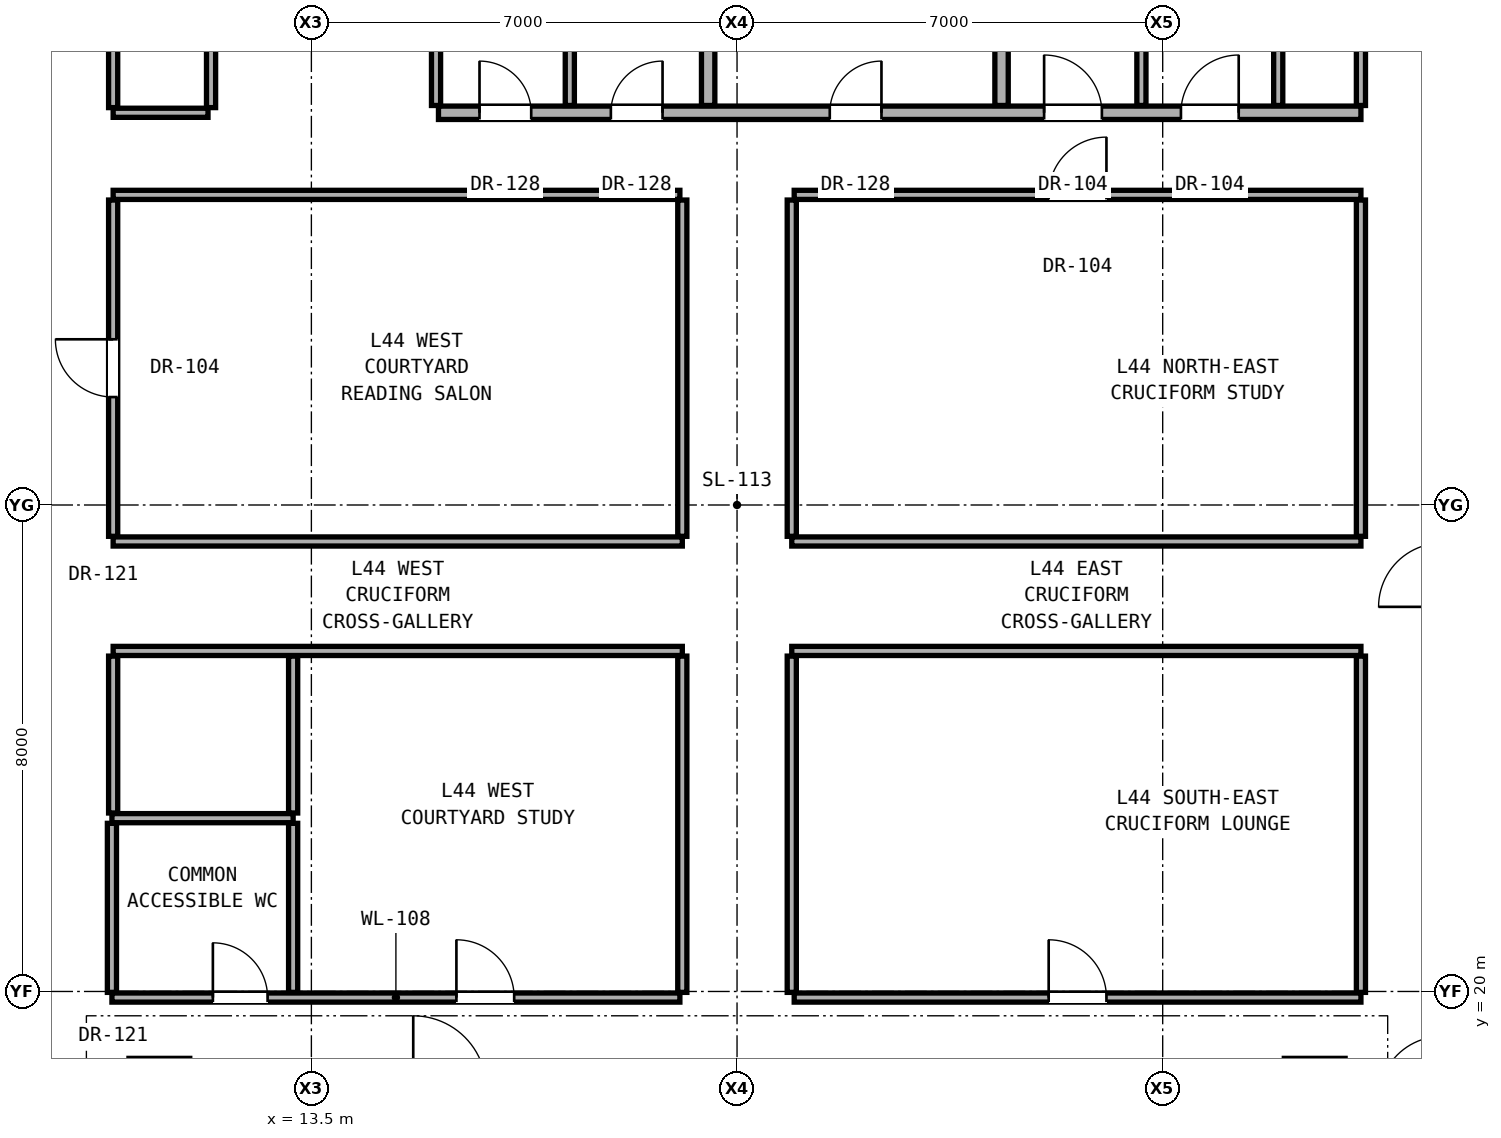
"""IFC4 building model, lengths in metres.
Left out: names, types, materials, properties, quantities, classifications, styles, units other than length and angle.
Written with IfcOpenShell. Run it as: python <this file> out.ifc"""

import sys

from ifc_helpers import new_model, si_unit, direction, frame, frame_2d, origin, place, context, subcontext, project, spatial, rectangle, extrude, element, fill, save


model = new_model("IFC4")
c1 = context("Model", 3, precision=1e-05, world=origin(), true_north=direction((0.0, 1.0)))
c2 = subcontext(c1, "Body", "Model", "MODEL_VIEW")
j1 = project(units=[si_unit("LENGTHUNIT", "METRE"), si_unit("PLANEANGLEUNIT", "RADIAN")], contexts=[c1])
p1 = place(None, origin())
s1 = spatial("IfcSite", under=j1, at=p1, CompositionType="ELEMENT")
p2 = place(p1, origin())
s2 = spatial("IfcBuilding", under=s1, at=p2, CompositionType="ELEMENT")
p3 = place(p2, frame((0.0, 0.0, 157.65)))
s3 = spatial("IfcBuildingStorey", under=s2, at=p3, CompositionType="ELEMENT", Elevation=157.65)
p4 = place(p3, frame((10.22, 19.9, 0.0), z_axis=(0.0, 0.0, 1.0), x_axis=(1.0, 0.0, 0.0)))
e1 = element("IfcWall", 1, at=p4, inside=s3, PredefinedType="PARTITIONING", context=c2, shape_type="SweptSolid", body=[
    extrude(rectangle(XDim=9.34, YDim=0.15, at=frame_2d((4.67, 0.0))), origin(), (0.0, 0.0, 1.0), 2.186),
])
p5 = place(p4, frame((1.66, 0.0, 0.0)))
e2 = element("IfcOpeningElement", 2, at=p5, cuts=e1, PredefinedType="OPENING", context=c2, shape_type="SweptSolid", body=[
    extrude(rectangle(XDim=0.9, YDim=2.1, at=frame_2d((0.45, 1.05))), frame((0.0, 0.085, 0.0), z_axis=(0.0, -1.0, 0.0), x_axis=(1.0, 0.0, 0.0)), (0.0, 0.0, 1.0), 0.17),
])
p6 = place(p4, frame((5.665, 0.0, 0.0)))
e3 = element("IfcOpeningElement", 3, at=p6, cuts=e1, PredefinedType="OPENING", context=c2, shape_type="SweptSolid", body=[
    extrude(rectangle(XDim=0.95, YDim=2.15, at=frame_2d((0.475, 1.075))), frame((0.0, 0.085, 0.0), z_axis=(0.0, -1.0, 0.0), x_axis=(1.0, 0.0, 0.0)), (0.0, 0.0, 1.0), 0.17),
])
p7 = place(p3, frame((21.44, 19.9, 0.0), z_axis=(0.0, 0.0, 1.0), x_axis=(1.0, 0.0, 0.0)))
e4 = element("IfcWall", 4, at=p7, inside=s3, PredefinedType="PARTITIONING", context=c2, shape_type="SweptSolid", body=[
    extrude(rectangle(XDim=9.32, YDim=0.15, at=frame_2d((4.66, 0.0))), origin(), (0.0, 0.0, 1.0), 2.186),
])
p8 = place(p7, frame((4.185, 0.0, 0.0)))
e5 = element("IfcOpeningElement", 5, at=p8, cuts=e4, PredefinedType="OPENING", context=c2, shape_type="SweptSolid", body=[
    extrude(rectangle(XDim=0.95, YDim=2.15, at=frame_2d((0.475, 1.075))), frame((0.0, 0.085, 0.0), z_axis=(0.0, -1.0, 0.0), x_axis=(1.0, 0.0, 0.0)), (0.0, 0.0, 1.0), 0.17),
])
p9 = place(p3, frame((10.22, 22.85, 0.0), z_axis=(0.0, 0.0, 1.0), x_axis=(1.0, 0.0, 0.0)))
e6 = element("IfcWall", 6, at=p9, inside=s3, PredefinedType="PARTITIONING", context=c2, shape_type="SweptSolid", body=[
    extrude(rectangle(XDim=2.98, YDim=0.15, at=frame_2d((1.49, 0.0))), origin(), (0.0, 0.0, 1.0), 2.186),
])
for number, where, z_axis, x_axis in (
    (7, (10.24, 25.6, 0.0), (0.0, 0.0, 1.0), (1.0, 0.0, 0.0)),
    (8, (21.4, 25.6, 0.0), (0.0, 0.0, 1.0), (1.0, 0.0, 0.0)),
    (9, (10.24, 27.4, 0.0), (0.0, 0.0, 1.0), (1.0, 0.0, 0.0)),
    (10, (21.4, 27.4, 0.0), (0.0, 0.0, 1.0), (1.0, 0.0, 0.0)),
):
    element("IfcWall", number, at=place(p3, frame(where, z_axis=z_axis, x_axis=x_axis)), inside=s3, PredefinedType="PARTITIONING", context=c2, shape_type="SweptSolid", body=[
        extrude(rectangle(XDim=9.36, YDim=0.15, at=frame_2d((4.68, 0.0))), origin(), (0.0, 0.0, 1.0), 2.186),
    ])
p10 = place(p3, frame((10.24, 33.1, 0.0), z_axis=(0.0, 0.0, 1.0), x_axis=(1.0, 0.0, 0.0)))
e11 = element("IfcWall", 11, at=p10, inside=s3, PredefinedType="PARTITIONING", context=c2, shape_type="SweptSolid", body=[
    extrude(rectangle(XDim=9.32, YDim=0.15, at=frame_2d((4.66, 0.0))), origin(), (0.0, 0.0, 1.0), 2.186),
])
p11 = place(p3, frame((21.44, 33.1, 0.0), z_axis=(0.0, 0.0, 1.0), x_axis=(1.0, 0.0, 0.0)))
e12 = element("IfcWall", 12, at=p11, inside=s3, PredefinedType="PARTITIONING", context=c2, shape_type="SweptSolid", body=[
    extrude(rectangle(XDim=9.32, YDim=0.15, at=frame_2d((4.66, 0.0))), origin(), (0.0, 0.0, 1.0), 2.186),
])
p12 = place(p11, frame((4.185, 0.0, 0.0)))
e13 = element("IfcOpeningElement", 13, at=p12, cuts=e12, PredefinedType="OPENING", context=c2, shape_type="SweptSolid", body=[
    extrude(rectangle(XDim=0.95, YDim=2.15, at=frame_2d((0.475, 1.075))), frame((0.0, 0.085, 0.0), z_axis=(0.0, -1.0, 0.0), x_axis=(1.0, 0.0, 0.0)), (0.0, 0.0, 1.0), 0.17),
])
p13 = place(p3, frame((10.24, 34.45, 0.0), z_axis=(0.0, 0.0, 1.0), x_axis=(1.0, 0.0, 0.0)))
e14 = element("IfcWall", 14, at=p13, inside=s3, PredefinedType="PARTITIONING", context=c2, shape_type="SweptSolid", body=[
    extrude(rectangle(XDim=1.56, YDim=0.15, at=frame_2d((0.78, 0.0))), origin(), (0.0, 0.0, 1.0), 2.186),
])
p14 = place(p3, frame((15.59, 34.45, 0.0), z_axis=(0.0, 0.0, 1.0), x_axis=(1.0, 0.0, 0.0)))
e15 = element("IfcWall", 15, at=p14, inside=s3, PredefinedType="SOLIDWALL", context=c2, shape_type="SweptSolid", body=[
    extrude(rectangle(XDim=15.17, YDim=0.22, at=frame_2d((7.585, 0.0))), origin(), (0.0, 0.0, 1.0), 2.186),
])
p15 = place(p14, frame((6.435, 0.0, 0.0)))
e16 = element("IfcOpeningElement", 16, at=p15, cuts=e15, PredefinedType="OPENING", context=c2, shape_type="SweptSolid", body=[
    extrude(rectangle(XDim=0.85, YDim=2.01, at=frame_2d((0.425, 1.005))), frame((0.0, 0.12, 0.0), z_axis=(0.0, -1.0, 0.0), x_axis=(1.0, 0.0, 0.0)), (0.0, 0.0, 1.0), 0.24),
])
p16 = place(p14, frame((9.96, 0.0, 0.0)))
e17 = element("IfcOpeningElement", 17, at=p16, cuts=e15, PredefinedType="OPENING", context=c2, shape_type="SweptSolid", body=[
    extrude(rectangle(XDim=0.95, YDim=2.15, at=frame_2d((0.475, 1.075))), frame((0.0, 0.12, 0.0), z_axis=(0.0, -1.0, 0.0), x_axis=(1.0, 0.0, 0.0)), (0.0, 0.0, 1.0), 0.24),
])
p17 = place(p14, frame((12.21, 0.0, 0.0)))
e18 = element("IfcOpeningElement", 18, at=p17, cuts=e15, PredefinedType="OPENING", context=c2, shape_type="SweptSolid", body=[
    extrude(rectangle(XDim=0.95, YDim=2.15, at=frame_2d((0.475, 1.075))), frame((0.0, 0.12, 0.0), z_axis=(0.0, -1.0, 0.0), x_axis=(1.0, 0.0, 0.0)), (0.0, 0.0, 1.0), 0.24),
])
p18 = place(p14, frame((0.675, 0.0, 0.0)))
e19 = element("IfcOpeningElement", 19, at=p18, cuts=e15, PredefinedType="OPENING", context=c2, shape_type="SweptSolid", body=[
    extrude(rectangle(XDim=0.85, YDim=2.01, at=frame_2d((0.425, 1.005))), frame((0.0, 0.12, 0.0), z_axis=(0.0, -1.0, 0.0), x_axis=(1.0, 0.0, 0.0)), (0.0, 0.0, 1.0), 0.24),
])
p19 = place(p14, frame((2.835, 0.0, 0.0)))
e20 = element("IfcOpeningElement", 20, at=p19, cuts=e15, PredefinedType="OPENING", context=c2, shape_type="SweptSolid", body=[
    extrude(rectangle(XDim=0.85, YDim=2.01, at=frame_2d((0.425, 1.005))), frame((0.0, 0.12, 0.0), z_axis=(0.0, -1.0, 0.0), x_axis=(1.0, 0.0, 0.0)), (0.0, 0.0, 1.0), 0.24),
])
p20 = place(p3, frame((10.22, 19.985, 0.0), z_axis=(0.0, 0.0, 1.0), x_axis=(0.0, 1.0, 0.0)))
e21 = element("IfcWall", 21, at=p20, inside=s3, PredefinedType="PARTITIONING", context=c2, shape_type="SweptSolid", body=[
    extrude(rectangle(XDim=2.78, YDim=0.15, at=frame_2d((1.39, 0.0))), origin(), (0.0, 0.0, 1.0), 3.05),
])
p21 = place(p3, frame((10.24, 22.935, 0.0), z_axis=(0.0, 0.0, 1.0), x_axis=(0.0, 1.0, 0.0)))
e22 = element("IfcWall", 22, at=p21, inside=s3, PredefinedType="PARTITIONING", context=c2, shape_type="SweptSolid", body=[
    extrude(rectangle(XDim=2.58, YDim=0.15, at=frame_2d((1.29, 0.0))), origin(), (0.0, 0.0, 1.0), 2.346),
])
p22 = place(p3, frame((10.24, 27.485, 0.0), z_axis=(0.0, 0.0, 1.0), x_axis=(0.0, 1.0, 0.0)))
e23 = element("IfcWall", 23, at=p22, inside=s3, PredefinedType="PARTITIONING", context=c2, shape_type="SweptSolid", body=[
    extrude(rectangle(XDim=5.53, YDim=0.15, at=frame_2d((2.765, 0.0))), origin(), (0.0, 0.0, 1.0), 2.346),
])
p23 = place(p22, frame((2.29, 0.0, 0.0)))
e24 = element("IfcOpeningElement", 24, at=p23, cuts=e23, PredefinedType="OPENING", context=c2, shape_type="SweptSolid", body=[
    extrude(rectangle(XDim=0.95, YDim=2.15, at=frame_2d((0.475, 1.075))), frame((0.0, 0.085, 0.0), z_axis=(0.0, -1.0, 0.0), x_axis=(1.0, 0.0, 0.0)), (0.0, 0.0, 1.0), 0.17),
])
p24 = place(p3, frame((10.24, 34.535, 0.0), z_axis=(0.0, 0.0, 1.0), x_axis=(0.0, 1.0, 0.0)))
e25 = element("IfcWall", 25, at=p24, inside=s3, PredefinedType="PARTITIONING", context=c2, shape_type="SweptSolid", body=[
    extrude(rectangle(XDim=9.13, YDim=0.15, at=frame_2d((4.565, 0.0))), origin(), (0.0, 0.0, 1.0), 2.442),
])
p25 = place(p3, frame((11.85, 34.535, 0.0), z_axis=(0.0, 0.0, 1.0), x_axis=(0.0, 1.0, 0.0)))
e26 = element("IfcWall", 26, at=p25, inside=s3, PredefinedType="PARTITIONING", context=c2, shape_type="SweptSolid", body=[
    extrude(rectangle(XDim=2.795, YDim=0.15, at=frame_2d((1.397, 0.0))), origin(), (0.0, 0.0, 1.0), 3.05),
])
p26 = place(p3, frame((13.2, 19.985, 0.0), z_axis=(0.0, 0.0, 1.0), x_axis=(0.0, 1.0, 0.0)))
e27 = element("IfcWall", 27, at=p26, inside=s3, PredefinedType="PARTITIONING", context=c2, shape_type="SweptSolid", body=[
    extrude(rectangle(XDim=2.78, YDim=0.15, at=frame_2d((1.39, 0.0))), origin(), (0.0, 0.0, 1.0), 3.05),
])
p27 = place(p3, frame((13.2, 22.935, 0.0), z_axis=(0.0, 0.0, 1.0), x_axis=(0.0, 1.0, 0.0)))
e28 = element("IfcWall", 28, at=p27, inside=s3, PredefinedType="PARTITIONING", context=c2, shape_type="SweptSolid", body=[
    extrude(rectangle(XDim=2.58, YDim=0.15, at=frame_2d((1.29, 0.0))), origin(), (0.0, 0.0, 1.0), 2.186),
])
for number, where, z_axis, x_axis in (
    (29, (15.55, 34.57, 0.0), (0.0, 0.0, 1.0), (0.0, 1.0, 0.0)),
    (30, (17.75, 34.57, 0.0), (0.0, 0.0, 1.0), (0.0, 1.0, 0.0)),
):
    element("IfcWall", number, at=place(p3, frame(where, z_axis=z_axis, x_axis=x_axis)), inside=s3, PredefinedType="PARTITIONING", context=c2, shape_type="SweptSolid", body=[
        extrude(rectangle(XDim=2.76, YDim=0.15, at=frame_2d((1.38, 0.0))), origin(), (0.0, 0.0, 1.0), 3.05),
    ])
for number, where, z_axis, x_axis in (
    (31, (19.6, 19.985, 0.0), (0.0, 0.0, 1.0), (0.0, 1.0, 0.0)),
    (32, (19.6, 27.485, 0.0), (0.0, 0.0, 1.0), (0.0, 1.0, 0.0)),
):
    element("IfcWall", number, at=place(p3, frame(where, z_axis=z_axis, x_axis=x_axis)), inside=s3, PredefinedType="PARTITIONING", context=c2, shape_type="SweptSolid", body=[
        extrude(rectangle(XDim=5.53, YDim=0.15, at=frame_2d((2.765, 0.0))), origin(), (0.0, 0.0, 1.0), 2.186),
    ])
p28 = place(p3, frame((20.025, 34.57, 0.0), z_axis=(0.0, 0.0, 1.0), x_axis=(0.0, 1.0, 0.0)))
e33 = element("IfcWall", 33, at=p28, inside=s3, PredefinedType="SOLIDWALL", context=c2, shape_type="SweptSolid", body=[
    extrude(rectangle(XDim=2.76, YDim=0.22, at=frame_2d((1.38, 0.0))), origin(), (0.0, 0.0, 1.0), 3.05),
])
for number, where, z_axis, x_axis in (
    (34, (21.4, 19.985, 0.0), (0.0, 0.0, 1.0), (0.0, 1.0, 0.0)),
    (35, (21.4, 27.485, 0.0), (0.0, 0.0, 1.0), (0.0, 1.0, 0.0)),
):
    element("IfcWall", number, at=place(p3, frame(where, z_axis=z_axis, x_axis=x_axis)), inside=s3, PredefinedType="PARTITIONING", context=c2, shape_type="SweptSolid", body=[
        extrude(rectangle(XDim=5.53, YDim=0.15, at=frame_2d((2.765, 0.0))), origin(), (0.0, 0.0, 1.0), 2.186),
    ])
p29 = place(p3, frame((24.85, 34.57, 0.0), z_axis=(0.0, 0.0, 1.0), x_axis=(0.0, 1.0, 0.0)))
e36 = element("IfcWall", 36, at=p29, inside=s3, PredefinedType="SOLIDWALL", context=c2, shape_type="SweptSolid", body=[
    extrude(rectangle(XDim=2.76, YDim=0.22, at=frame_2d((1.38, 0.0))), origin(), (0.0, 0.0, 1.0), 3.05),
])
for number, where, z_axis, x_axis in (
    (37, (27.15, 34.57, 0.0), (0.0, 0.0, 1.0), (0.0, 1.0, 0.0)),
    (38, (29.4, 34.57, 0.0), (0.0, 0.0, 1.0), (0.0, 1.0, 0.0)),
):
    element("IfcWall", number, at=place(p3, frame(where, z_axis=z_axis, x_axis=x_axis)), inside=s3, PredefinedType="PARTITIONING", context=c2, shape_type="SweptSolid", body=[
        extrude(rectangle(XDim=2.76, YDim=0.15, at=frame_2d((1.38, 0.0))), origin(), (0.0, 0.0, 1.0), 3.05),
    ])
for number, where, z_axis, x_axis in (
    (39, (30.76, 19.985, 0.0), (0.0, 0.0, 1.0), (0.0, 1.0, 0.0)),
    (40, (30.76, 27.485, 0.0), (0.0, 0.0, 1.0), (0.0, 1.0, 0.0)),
):
    element("IfcWall", number, at=place(p3, frame(where, z_axis=z_axis, x_axis=x_axis)), inside=s3, PredefinedType="PARTITIONING", context=c2, shape_type="SweptSolid", body=[
        extrude(rectangle(XDim=5.53, YDim=0.15, at=frame_2d((2.765, 0.0))), origin(), (0.0, 0.0, 1.0), 2.346),
    ])
p30 = place(p3, frame((30.76, 34.57, 0.0), z_axis=(0.0, 0.0, 1.0), x_axis=(0.0, 1.0, 0.0)))
e41 = element("IfcWall", 41, at=p30, inside=s3, PredefinedType="PARTITIONING", context=c2, shape_type="SweptSolid", body=[
    extrude(rectangle(XDim=9.095, YDim=0.15, at=frame_2d((4.547, 0.0))), origin(), (0.0, 0.0, 1.0), 2.442),
])
p31 = place(p15, origin())
e42 = element("IfcDoor", 42, at=p31, inside=s3, OperationType="SINGLE_SWING_RIGHT", PredefinedType="DOOR", context=c2, shape_type="SweptSolid", body=[
    extrude(rectangle(XDim=0.85, YDim=2.01, at=frame_2d((0.425, 1.005))), frame((0.0, 0.025, 0.0), z_axis=(0.0, -1.0, 0.0), x_axis=(1.0, 0.0, 0.0)), (0.0, 0.0, 1.0), 0.05),
])
fill(e16, e42)
p32 = place(p16, origin())
e43 = element("IfcDoor", 43, at=p32, inside=s3, OperationType="SINGLE_SWING_LEFT", PredefinedType="DOOR", context=c2, shape_type="SweptSolid", body=[
    extrude(rectangle(XDim=0.95, YDim=2.15, at=frame_2d((0.475, 1.075))), frame((0.0, 0.025, 0.0), z_axis=(0.0, -1.0, 0.0), x_axis=(1.0, 0.0, 0.0)), (0.0, 0.0, 1.0), 0.05),
])
fill(e17, e43)
p33 = place(p17, origin())
e44 = element("IfcDoor", 44, at=p33, inside=s3, OperationType="SINGLE_SWING_RIGHT", PredefinedType="DOOR", context=c2, shape_type="SweptSolid", body=[
    extrude(rectangle(XDim=0.95, YDim=2.15, at=frame_2d((0.475, 1.075))), frame((0.0, 0.025, 0.0), z_axis=(0.0, -1.0, 0.0), x_axis=(1.0, 0.0, 0.0)), (0.0, 0.0, 1.0), 0.05),
])
fill(e18, e44)
p34 = place(p18, origin())
e45 = element("IfcDoor", 45, at=p34, inside=s3, OperationType="SINGLE_SWING_LEFT", PredefinedType="DOOR", context=c2, shape_type="SweptSolid", body=[
    extrude(rectangle(XDim=0.85, YDim=2.01, at=frame_2d((0.425, 1.005))), frame((0.0, 0.025, 0.0), z_axis=(0.0, -1.0, 0.0), x_axis=(1.0, 0.0, 0.0)), (0.0, 0.0, 1.0), 0.05),
])
fill(e19, e45)
p35 = place(p19, origin())
e46 = element("IfcDoor", 46, at=p35, inside=s3, OperationType="SINGLE_SWING_RIGHT", PredefinedType="DOOR", context=c2, shape_type="SweptSolid", body=[
    extrude(rectangle(XDim=0.85, YDim=2.01, at=frame_2d((0.425, 1.005))), frame((0.0, 0.025, 0.0), z_axis=(0.0, -1.0, 0.0), x_axis=(1.0, 0.0, 0.0)), (0.0, 0.0, 1.0), 0.05),
])
fill(e20, e46)
p36 = place(p5, origin())
e47 = element("IfcDoor", 47, at=p36, inside=s3, OperationType="SINGLE_SWING_LEFT", PredefinedType="DOOR", context=c2, shape_type="SweptSolid", body=[
    extrude(rectangle(XDim=0.9, YDim=2.1, at=frame_2d((0.45, 1.05))), frame((0.0, 0.025, 0.0), z_axis=(0.0, -1.0, 0.0), x_axis=(1.0, 0.0, 0.0)), (0.0, 0.0, 1.0), 0.05),
])
fill(e2, e47)
p37 = place(p6, origin())
e48 = element("IfcDoor", 48, at=p37, inside=s3, OperationType="SINGLE_SWING_LEFT", PredefinedType="DOOR", context=c2, shape_type="SweptSolid", body=[
    extrude(rectangle(XDim=0.95, YDim=2.15, at=frame_2d((0.475, 1.075))), frame((0.0, 0.025, 0.0), z_axis=(0.0, -1.0, 0.0), x_axis=(1.0, 0.0, 0.0)), (0.0, 0.0, 1.0), 0.05),
])
fill(e3, e48)
p38 = place(p23, origin())
e49 = element("IfcDoor", 49, at=p38, inside=s3, OperationType="SINGLE_SWING_RIGHT", PredefinedType="DOOR", context=c2, shape_type="SweptSolid", body=[
    extrude(rectangle(XDim=0.95, YDim=2.15, at=frame_2d((0.475, 1.075))), frame((0.0, 0.025, 0.0), z_axis=(0.0, -1.0, 0.0), x_axis=(1.0, 0.0, 0.0)), (0.0, 0.0, 1.0), 0.05),
])
fill(e24, e49)
p39 = place(p8, origin())
e50 = element("IfcDoor", 50, at=p39, inside=s3, OperationType="SINGLE_SWING_LEFT", PredefinedType="DOOR", context=c2, shape_type="SweptSolid", body=[
    extrude(rectangle(XDim=0.95, YDim=2.15, at=frame_2d((0.475, 1.075))), frame((0.0, 0.025, 0.0), z_axis=(0.0, -1.0, 0.0), x_axis=(1.0, 0.0, 0.0)), (0.0, 0.0, 1.0), 0.05),
])
fill(e5, e50)
p40 = place(p12, origin())
e51 = element("IfcDoor", 51, at=p40, inside=s3, OperationType="SINGLE_SWING_RIGHT", PredefinedType="DOOR", context=c2, shape_type="SweptSolid", body=[
    extrude(rectangle(XDim=0.95, YDim=2.15, at=frame_2d((0.475, 1.075))), frame((0.0, 0.025, 0.0), z_axis=(0.0, -1.0, 0.0), x_axis=(1.0, 0.0, 0.0)), (0.0, 0.0, 1.0), 0.05),
])
fill(e13, e51)
save(model, sys.argv[1])
